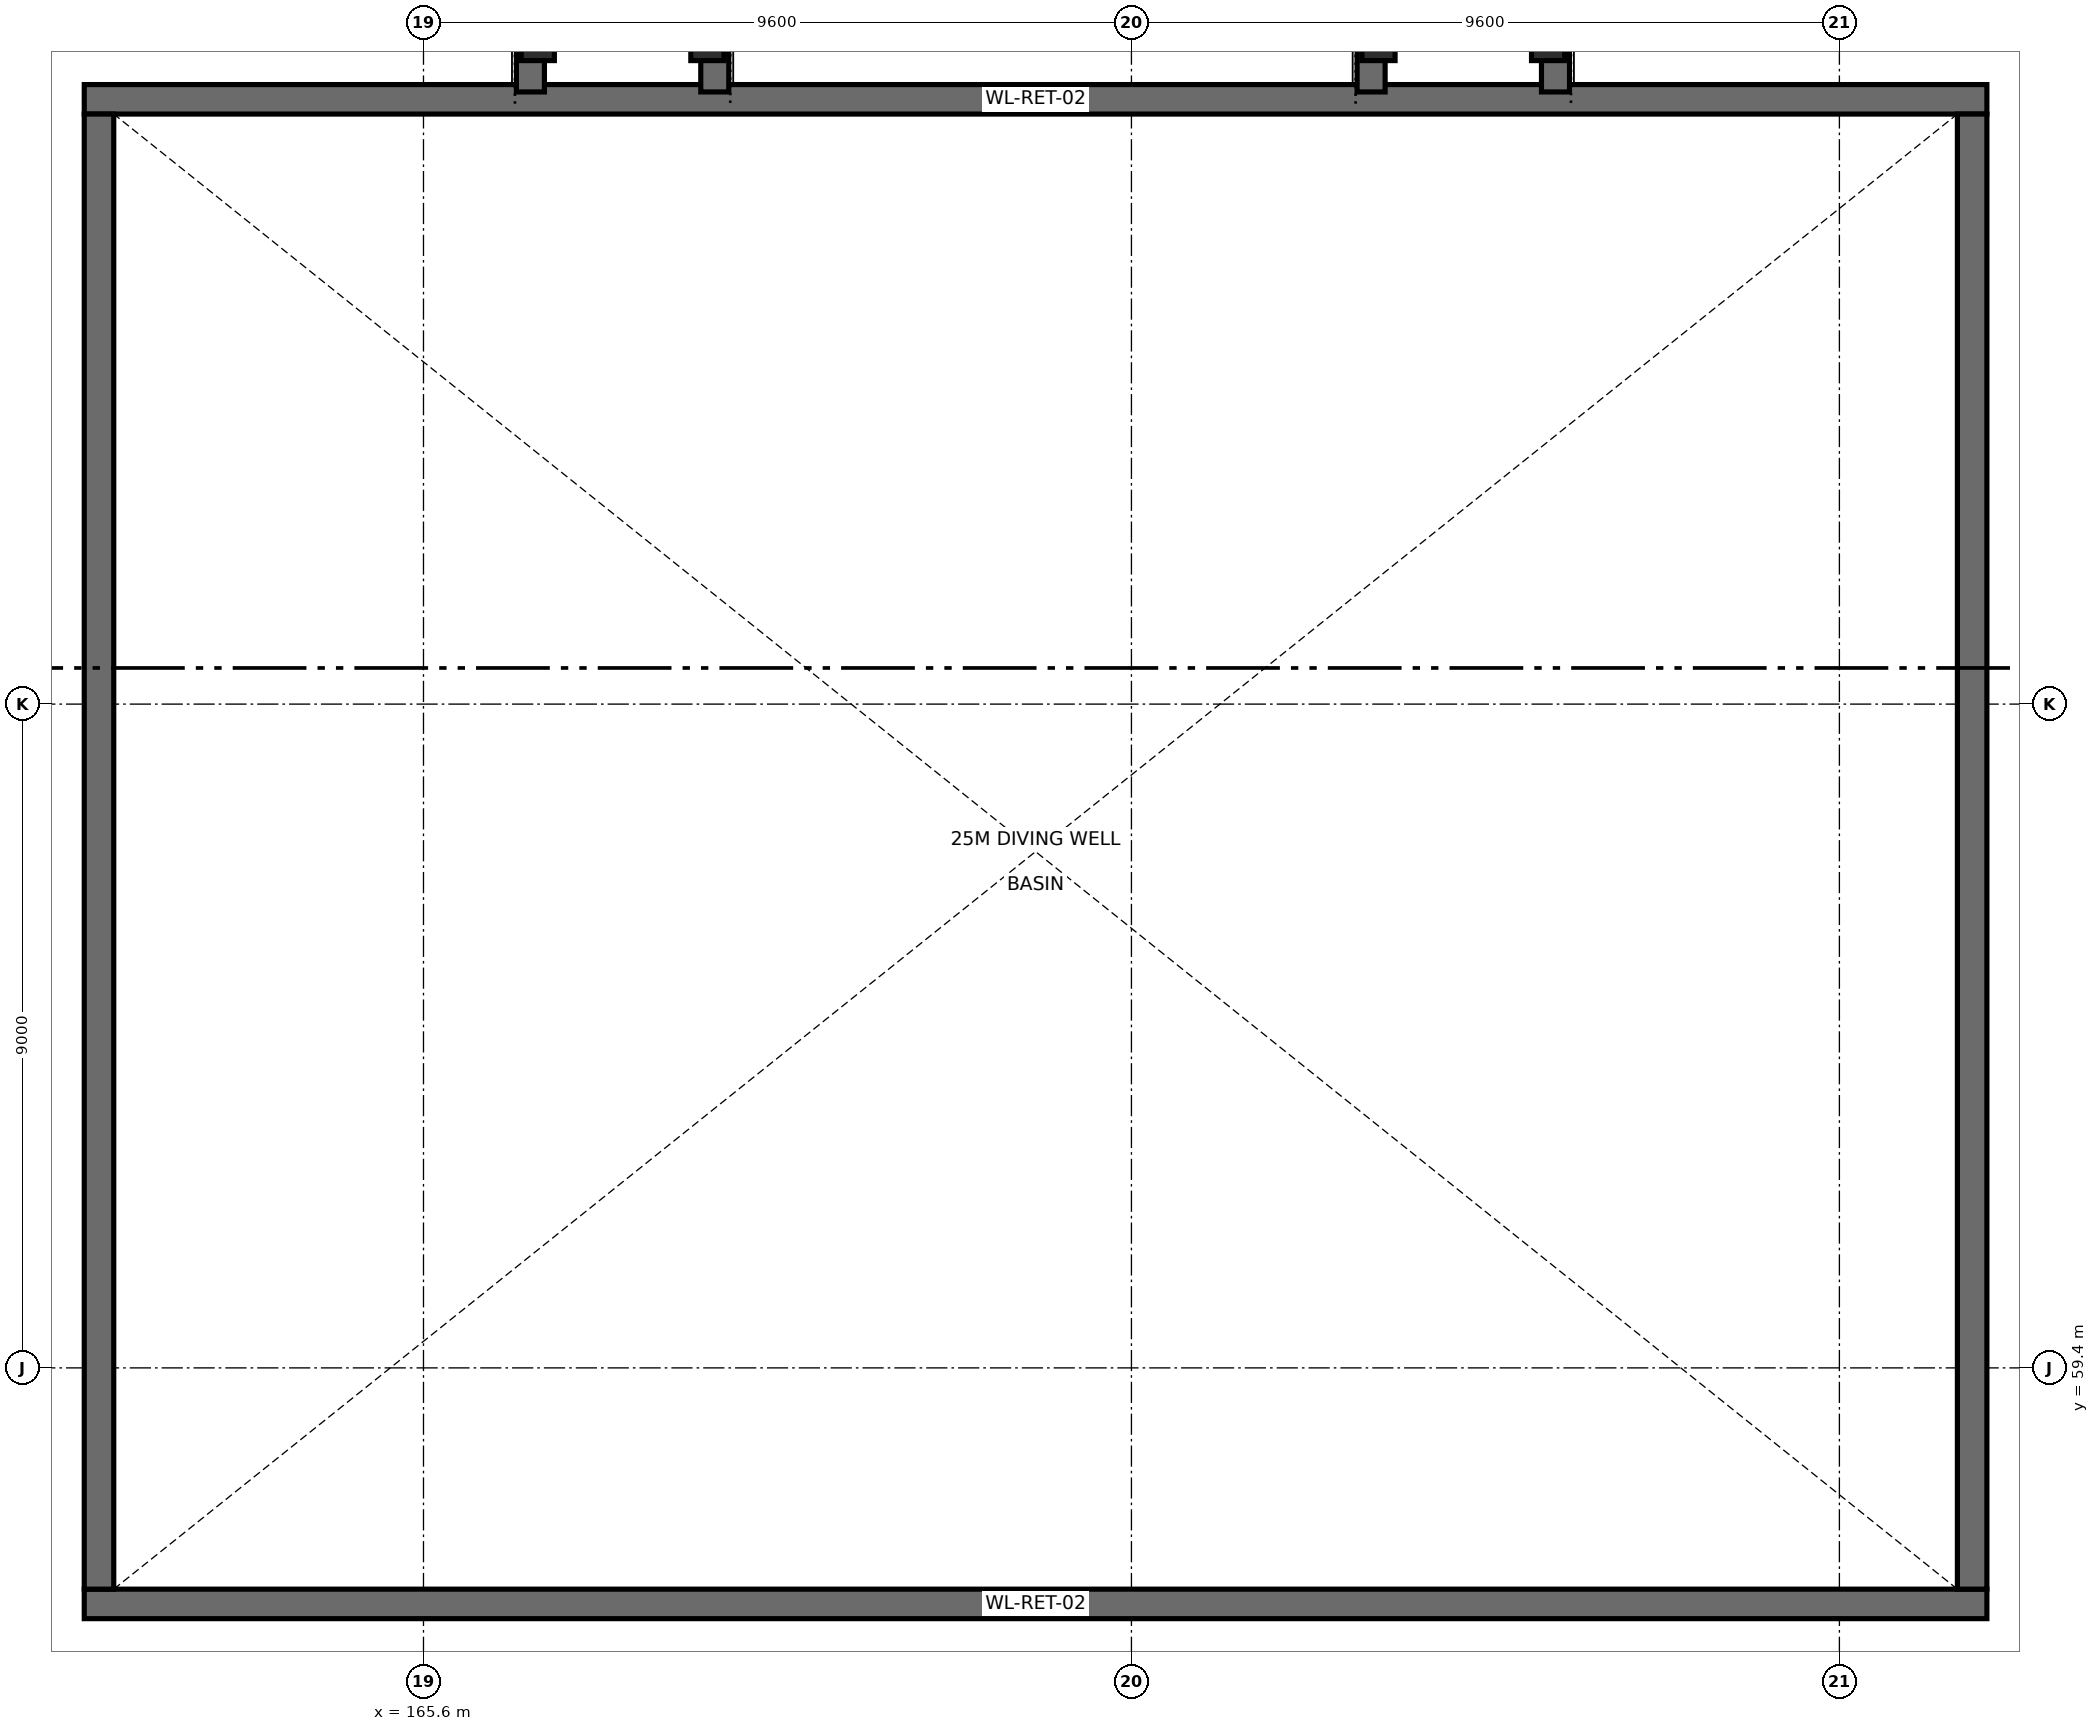
"""IFC4 building model, lengths in metres.
Left out: names, types, materials, properties, quantities, classifications, styles, units other than length and angle.
Written with IfcOpenShell. Run it as: python <this file> out.ifc"""

import sys

from ifc_helpers import new_model, si_unit, direction, frame, frame_2d, origin, origin_2d, place, context, subcontext, project, spatial, rectangle, extrude, element, save


model = new_model("IFC4")
c1 = context("Model", 3, precision=1e-05, world=origin(), true_north=direction((0.0, 1.0)))
c2 = subcontext(c1, "Body", "Model", "MODEL_VIEW")
j1 = project(units=[si_unit("LENGTHUNIT", "METRE"), si_unit("PLANEANGLEUNIT", "RADIAN")], contexts=[c1])
p1 = place(None, origin())
s1 = spatial("IfcSite", under=j1, at=p1, CompositionType="ELEMENT")
p2 = place(p1, origin())
s2 = spatial("IfcBuilding", under=s1, at=p2, CompositionType="ELEMENT")
p3 = place(p2, origin())
s3 = spatial("IfcBuildingStorey", under=s2, at=p3, CompositionType="ELEMENT", Elevation=0.0)
for number, where, z_axis, x_axis in (
    (1, (161.0, 56.2, -5.0), (0.0, 0.0, 1.0), (1.0, 0.0, 0.0)),
    (2, (161.0, 76.6, -5.0), (0.0, 0.0, 1.0), (1.0, 0.0, 0.0)),
):
    element("IfcWall", number, at=place(p3, frame(where, z_axis=z_axis, x_axis=x_axis)), inside=s3, PredefinedType="USERDEFINED", context=c2, shape_type="SweptSolid", body=[
        extrude(rectangle(XDim=25.8, YDim=0.4, at=frame_2d((12.9, 0.0))), origin(), (0.0, 0.0, 1.0), 5.08),
    ])
for number, where, z_axis, x_axis in (
    (3, (161.2, 56.4, -5.0), (0.0, 0.0, 1.0), (0.0, 1.0, 0.0)),
    (4, (186.6, 56.4, -5.0), (0.0, 0.0, 1.0), (0.0, 1.0, 0.0)),
):
    element("IfcWall", number, at=place(p3, frame(where, z_axis=z_axis, x_axis=x_axis)), inside=s3, PredefinedType="USERDEFINED", context=c2, shape_type="SweptSolid", body=[
        extrude(rectangle(XDim=20.0, YDim=0.4, at=frame_2d((10.0, 0.0))), origin(), (0.0, 0.0, 1.0), 5.08),
    ])
for number, where, z_axis, x_axis in (
    (5, (167.15, 77.35, 0.0), (0.0, 0.0, 1.0), (1.0, 0.0, 0.0)),
    (6, (169.45, 77.35, 0.0), (0.0, 0.0, 1.0), (1.0, 0.0, 0.0)),
):
    element("IfcColumn", number, at=place(p3, frame(where, z_axis=z_axis, x_axis=x_axis)), inside=s3, PredefinedType="COLUMN", context=c2, shape_type="SweptSolid", body=[
        extrude(rectangle(XDim=0.45, YDim=0.45, at=origin_2d()), origin(), (0.0, 0.0, 1.0), 0.74),
    ])
for number, where, z_axis, x_axis in (
    (7, (167.05, 76.7, -4.8), (0.0, 0.0, 1.0), (0.0, 1.0, 0.0)),
    (8, (169.55, 76.7, -4.8), (0.0, 0.0, 1.0), (0.0, 1.0, 0.0)),
):
    element("IfcWall", number, at=place(p3, frame(where, z_axis=z_axis, x_axis=x_axis)), inside=s3, PredefinedType="SHEAR", context=c2, shape_type="SweptSolid", body=[
        extrude(rectangle(XDim=4.6, YDim=0.38, at=frame_2d((2.3, 0.0))), origin(), (0.0, 0.0, 1.0), 5.56),
    ])
for number, where, z_axis, x_axis in (
    (9, (178.55, 77.35, 0.0), (0.0, 0.0, 1.0), (1.0, 0.0, 0.0)),
    (10, (180.85, 77.35, 0.0), (0.0, 0.0, 1.0), (1.0, 0.0, 0.0)),
):
    element("IfcColumn", number, at=place(p3, frame(where, z_axis=z_axis, x_axis=x_axis)), inside=s3, PredefinedType="COLUMN", context=c2, shape_type="SweptSolid", body=[
        extrude(rectangle(XDim=0.45, YDim=0.45, at=origin_2d()), origin(), (0.0, 0.0, 1.0), 2.74),
    ])
for number, where, z_axis, x_axis in (
    (11, (178.45, 76.7, -4.8), (0.0, 0.0, 1.0), (0.0, 1.0, 0.0)),
    (12, (180.95, 76.7, -4.8), (0.0, 0.0, 1.0), (0.0, 1.0, 0.0)),
):
    element("IfcWall", number, at=place(p3, frame(where, z_axis=z_axis, x_axis=x_axis)), inside=s3, PredefinedType="SHEAR", context=c2, shape_type="SweptSolid", body=[
        extrude(rectangle(XDim=4.6, YDim=0.38, at=frame_2d((2.3, 0.0))), origin(), (0.0, 0.0, 1.0), 7.56),
    ])
save(model, sys.argv[1])
